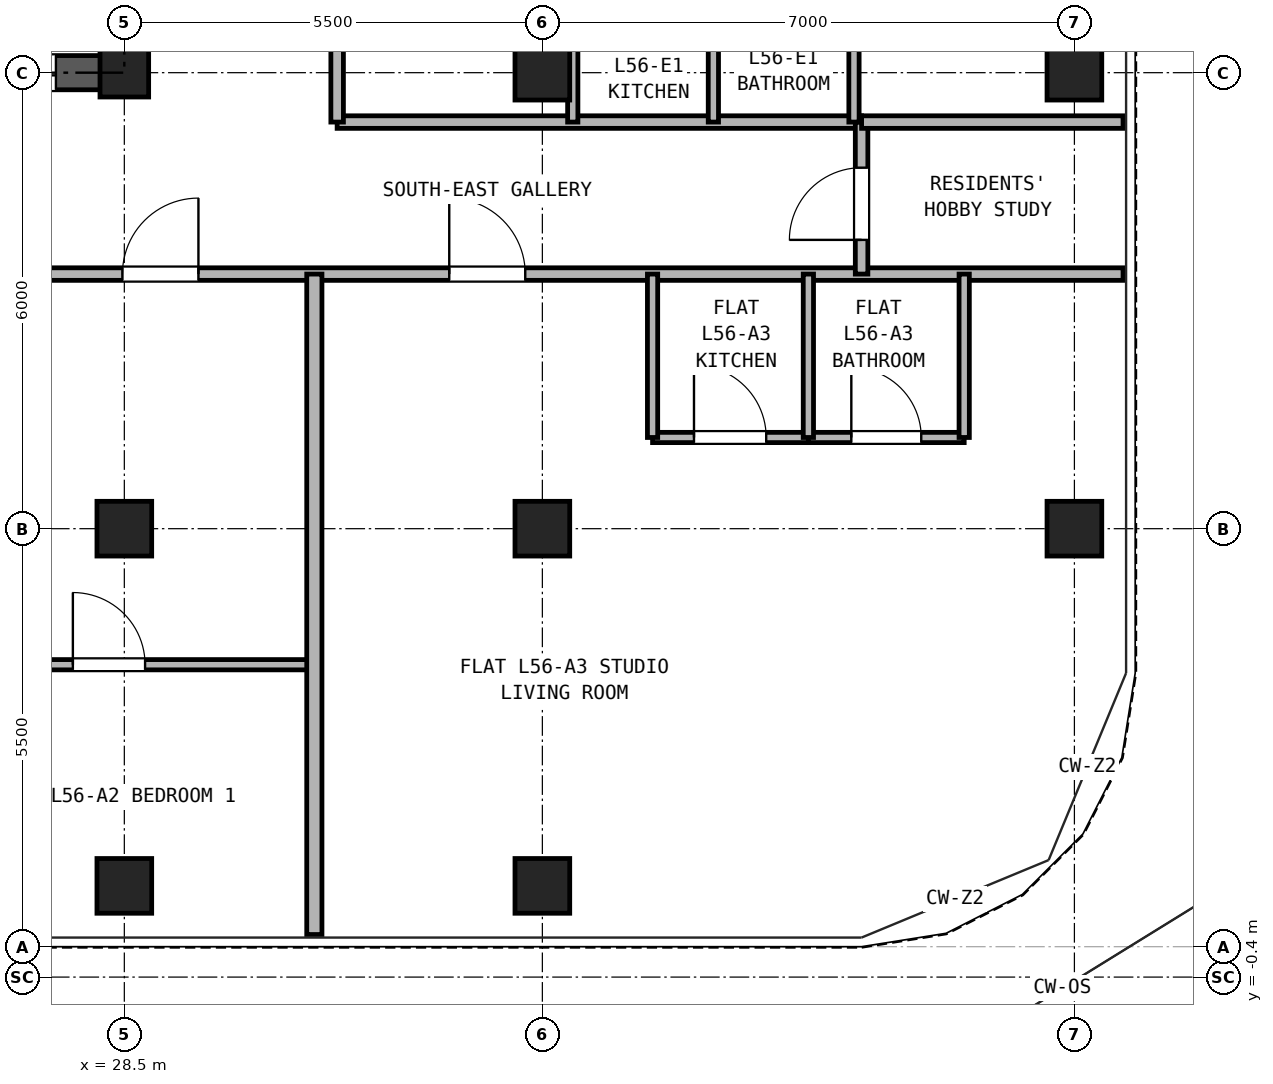
"""IFC4 building model, lengths in metres.
Left out: names, types, materials, properties, quantities, classifications, styles, units other than length and angle.
Written with IfcOpenShell. Run it as: python <this file> out.ifc"""

import sys

from ifc_helpers import new_model, si_unit, direction, frame, frame_2d, origin, origin_2d, place, context, subcontext, project, spatial, rectangle, hollow_rectangle, extrude, source, transform, mapped, element, fill, save


model = new_model("IFC4")
c1 = context("Model", 3, precision=1e-05, world=origin(), true_north=direction((0.0, 1.0)))
c2 = subcontext(c1, "Body", "Model", "MODEL_VIEW")
j1 = project(units=[si_unit("LENGTHUNIT", "METRE"), si_unit("PLANEANGLEUNIT", "RADIAN")], contexts=[c1])
p1 = place(None, origin())
s1 = spatial("IfcSite", under=j1, at=p1, CompositionType="ELEMENT")
p2 = place(p1, origin())
s2 = spatial("IfcBuilding", under=s1, at=p2, CompositionType="ELEMENT")
p3 = place(p2, frame((0.0, 0.0, 199.6)))
s3 = spatial("IfcBuildingStorey", under=s2, at=p3, CompositionType="ELEMENT", Elevation=199.6)
m1 = source(origin(), c2, "Body", "SweptSolid", [
    extrude(hollow_rectangle(XDim=0.72, YDim=0.72, WallThickness=0.04, at=origin_2d()), origin(), (0.0, 0.0, 1.0), 2.95),
])
for number, where, z_axis, x_axis in (
    (1, (28.5, 0.8, 0.0), (0.0, 0.0, 1.0), (1.0, 0.0, 0.0)),
    (2, (34.0, 0.8, 0.0), (0.0, 0.0, 1.0), (1.0, 0.0, 0.0)),
    (3, (41.0, 5.5, 0.0), (0.0, 0.0, 1.0), (1.0, 0.0, 0.0)),
    (4, (41.0, 11.5, 0.0), (0.0, 0.0, 1.0), (1.0, 0.0, 0.0)),
    (5, (28.5, 5.5, 0.0), (0.0, 0.0, 1.0), (1.0, 0.0, 0.0)),
):
    element("IfcColumn", number, at=place(p3, frame(where, z_axis=z_axis, x_axis=x_axis)), inside=s3, PredefinedType="COLUMN", context=c2, shape_type="MappedRepresentation", body=[
        mapped(m1, transform((0.0, 0.0, 0.0), x_axis=(1.0, 0.0, 0.0), y_axis=(0.0, 1.0, 0.0), z_axis=(0.0, 0.0, 1.0), scale=1.0)),
    ])
m2 = source(origin(), c2, "Body", "SweptSolid", [
    extrude(hollow_rectangle(XDim=0.64, YDim=0.64, WallThickness=0.035, at=origin_2d()), origin(), (0.0, 0.0, 1.0), 2.95),
])
p4 = place(p3, frame((28.5, 11.5, 0.0), z_axis=(0.0, 0.0, 1.0), x_axis=(1.0, 0.0, 0.0)))
e6 = element("IfcColumn", 6, at=p4, inside=s3, PredefinedType="COLUMN", context=c2, shape_type="MappedRepresentation", body=[
    mapped(m2, transform((0.0, 0.0, 0.0), x_axis=(1.0, 0.0, 0.0), y_axis=(0.0, 1.0, 0.0), z_axis=(0.0, 0.0, 1.0), scale=1.0)),
])
for number, where, z_axis, x_axis in (
    (7, (34.0, 5.5, 0.0), (0.0, 0.0, 1.0), (1.0, 0.0, 0.0)),
    (8, (34.0, 11.5, 0.0), (0.0, 0.0, 1.0), (1.0, 0.0, 0.0)),
):
    element("IfcColumn", number, at=place(p3, frame(where, z_axis=z_axis, x_axis=x_axis)), inside=s3, PredefinedType="COLUMN", context=c2, shape_type="MappedRepresentation", body=[
        mapped(m1, transform((0.0, 0.0, 0.0), x_axis=(1.0, 0.0, 0.0), y_axis=(0.0, 1.0, 0.0), z_axis=(0.0, 0.0, 1.0), scale=1.0)),
    ])
p5 = place(p3, frame((18.275, 11.5, 0.0), z_axis=(0.0, 0.0, 1.0), x_axis=(1.0, 0.0, 0.0)))
e9 = element("IfcWall", 9, at=p5, inside=s3, PredefinedType="SHEAR", context=c2, shape_type="SweptSolid", body=[
    extrude(rectangle(XDim=10.45, YDim=0.45, at=frame_2d((5.225, 0.0))), origin(), (0.0, 0.0, 1.0), 2.95),
])
p6 = place(p5, frame((1.825, 0.0, 0.0)))
e10 = element("IfcOpeningElement", 10, at=p6, cuts=e9, PredefinedType="OPENING", context=c2, shape_type="SweptSolid", body=[
    extrude(rectangle(XDim=0.95, YDim=2.15, at=frame_2d((0.475, 1.075))), frame((0.0, 0.235, 0.0), z_axis=(0.0, -1.0, 0.0), x_axis=(1.0, 0.0, 0.0)), (0.0, 0.0, 1.0), 0.47),
])
p7 = place(p5, frame((5.325, 0.0, 0.0)))
e11 = element("IfcOpeningElement", 11, at=p7, cuts=e9, PredefinedType="OPENING", context=c2, shape_type="SweptSolid", body=[
    extrude(rectangle(XDim=0.95, YDim=2.15, at=frame_2d((0.475, 1.075))), frame((0.0, 0.235, 0.0), z_axis=(0.0, -1.0, 0.0), x_axis=(1.0, 0.0, 0.0)), (0.0, 0.0, 1.0), 0.47),
])
p8 = place(p5, frame((8.225, 0.0, 0.0)))
e12 = element("IfcOpeningElement", 12, at=p8, cuts=e9, PredefinedType="OPENING", context=c2, shape_type="SweptSolid", body=[
    extrude(rectangle(XDim=1.1, YDim=2.25, at=frame_2d((0.55, 1.125))), frame((0.0, 0.235, 0.0), z_axis=(0.0, -1.0, 0.0), x_axis=(1.0, 0.0, 0.0)), (0.0, 0.0, 1.0), 0.47),
])
p9 = place(p3, frame((28.5, 11.725, 0.0), z_axis=(0.0, 0.0, 1.0), x_axis=(0.0, 1.0, 0.0)))
e13 = element("IfcWall", 13, at=p9, inside=s3, PredefinedType="SHEAR", context=c2, shape_type="SweptSolid", body=[
    extrude(rectangle(XDim=16.8, YDim=0.45, at=frame_2d((8.4, 0.0))), origin(), (0.0, 0.0, 1.0), 2.95),
])
p10 = place(p9, frame((7.425, 0.0, 0.0)))
e14 = element("IfcOpeningElement", 14, at=p10, cuts=e13, PredefinedType="OPENING", context=c2, shape_type="SweptSolid", body=[
    extrude(rectangle(XDim=1.15, YDim=2.2, at=frame_2d((0.575, 1.1))), frame((0.0, 0.235, 0.0), z_axis=(0.0, -1.0, 0.0), x_axis=(1.0, 0.0, 0.0)), (0.0, 0.0, 1.0), 0.47),
])
p11 = place(p3, frame((0.16, 8.85, 0.0), z_axis=(0.0, 0.0, 1.0), x_axis=(1.0, 0.0, 0.0)))
e15 = element("IfcWall", 15, at=p11, inside=s3, PredefinedType="PARTITIONING", context=c2, shape_type="SweptSolid", body=[
    extrude(rectangle(XDim=41.48, YDim=0.165, at=frame_2d((20.74, 0.0))), origin(), (0.0, 0.0, 1.0), 2.95),
])
p12 = place(p11, frame((14.815, 0.0, 0.0)))
e16 = element("IfcOpeningElement", 16, at=p12, cuts=e15, PredefinedType="OPENING", context=c2, shape_type="SweptSolid", body=[
    extrude(rectangle(XDim=1.0, YDim=2.15, at=frame_2d((0.5, 1.075))), frame((0.0, 0.093, 0.0), z_axis=(0.0, -1.0, 0.0), x_axis=(1.0, 0.0, 0.0)), (0.0, 0.0, 1.0), 0.185),
])
p13 = place(p11, frame((28.315, 0.0, 0.0)))
e17 = element("IfcOpeningElement", 17, at=p13, cuts=e15, PredefinedType="OPENING", context=c2, shape_type="SweptSolid", body=[
    extrude(rectangle(XDim=1.0, YDim=2.15, at=frame_2d((0.5, 1.075))), frame((0.0, 0.093, 0.0), z_axis=(0.0, -1.0, 0.0), x_axis=(1.0, 0.0, 0.0)), (0.0, 0.0, 1.0), 0.185),
])
p14 = place(p11, frame((32.615, 0.0, 0.0)))
e18 = element("IfcOpeningElement", 18, at=p14, cuts=e15, PredefinedType="OPENING", context=c2, shape_type="SweptSolid", body=[
    extrude(rectangle(XDim=1.0, YDim=2.15, at=frame_2d((0.5, 1.075))), frame((0.0, 0.093, 0.0), z_axis=(0.0, -1.0, 0.0), x_axis=(1.0, 0.0, 0.0)), (0.0, 0.0, 1.0), 0.185),
])
p15 = place(p3, frame((31.3, 10.85, 0.0), z_axis=(0.0, 0.0, 1.0), x_axis=(1.0, 0.0, 0.0)))
e19 = element("IfcWall", 19, at=p15, inside=s3, PredefinedType="PARTITIONING", context=c2, shape_type="SweptSolid", body=[
    extrude(rectangle(XDim=6.9, YDim=0.165, at=frame_2d((3.45, 0.0))), origin(), (0.0, 0.0, 1.0), 2.95),
])
p16 = place(p3, frame((38.2, 8.85, 0.0), z_axis=(0.0, 0.0, 1.0), x_axis=(0.0, 1.0, 0.0)))
e20 = element("IfcWall", 20, at=p16, inside=s3, PredefinedType="PARTITIONING", context=c2, shape_type="SweptSolid", body=[
    extrude(rectangle(XDim=2.0, YDim=0.165, at=frame_2d((1.0, 0.0))), origin(), (0.0, 0.0, 1.0), 2.95),
])
p17 = place(p16, frame((0.45, 0.0, 0.0)))
e21 = element("IfcOpeningElement", 21, at=p17, cuts=e20, PredefinedType="OPENING", context=c2, shape_type="SweptSolid", body=[
    extrude(rectangle(XDim=0.95, YDim=2.15, at=frame_2d((0.475, 1.075))), frame((0.0, 0.093, 0.0), z_axis=(0.0, -1.0, 0.0), x_axis=(1.0, 0.0, 0.0)), (0.0, 0.0, 1.0), 0.185),
])
p18 = place(p3, frame((31.3, 10.85, 0.0), z_axis=(0.0, 0.0, 1.0), x_axis=(0.0, 1.0, 0.0)))
e22 = element("IfcWall", 22, at=p18, inside=s3, PredefinedType="PARTITIONING", context=c2, shape_type="SweptSolid", body=[
    extrude(rectangle(XDim=24.29, YDim=0.165, at=frame_2d((12.145, 0.0))), origin(), (0.0, 0.0, 1.0), 2.95),
])
p19 = place(p18, frame((3.675, 0.0, 0.0)))
e23 = element("IfcOpeningElement", 23, at=p19, cuts=e22, PredefinedType="OPENING", context=c2, shape_type="SweptSolid", body=[
    extrude(rectangle(XDim=1.0, YDim=2.15, at=frame_2d((0.5, 1.075))), frame((0.0, 0.093, 0.0), z_axis=(0.0, -1.0, 0.0), x_axis=(1.0, 0.0, 0.0)), (0.0, 0.0, 1.0), 0.185),
])
p20 = place(p18, frame((11.95, 0.0, 0.0)))
e24 = element("IfcOpeningElement", 24, at=p20, cuts=e22, PredefinedType="OPENING", context=c2, shape_type="SweptSolid", body=[
    extrude(rectangle(XDim=1.0, YDim=2.15, at=frame_2d((0.5, 1.075))), frame((0.0, 0.093, 0.0), z_axis=(0.0, -1.0, 0.0), x_axis=(1.0, 0.0, 0.0)), (0.0, 0.0, 1.0), 0.185),
])
p21 = place(p18, frame((17.75, 0.0, 0.0)))
e25 = element("IfcOpeningElement", 25, at=p21, cuts=e22, PredefinedType="OPENING", context=c2, shape_type="SweptSolid", body=[
    extrude(rectangle(XDim=1.0, YDim=2.15, at=frame_2d((0.5, 1.075))), frame((0.0, 0.093, 0.0), z_axis=(0.0, -1.0, 0.0), x_axis=(1.0, 0.0, 0.0)), (0.0, 0.0, 1.0), 0.185),
])
p22 = place(p3, frame((25.606, 3.71, 0.0), z_axis=(0.0, 0.0, 1.0), x_axis=(1.0, 0.0, 0.0)))
e26 = element("IfcWall", 26, at=p22, inside=s3, PredefinedType="PARTITIONING", context=c2, shape_type="SweptSolid", body=[
    extrude(rectangle(XDim=5.394, YDim=0.135, at=frame_2d((2.697, 0.0))), origin(), (0.0, 0.0, 1.0), 2.95),
])
p23 = place(p22, frame((2.217, 0.0, 0.0)))
e27 = element("IfcOpeningElement", 27, at=p23, cuts=e26, PredefinedType="OPENING", context=c2, shape_type="SweptSolid", body=[
    extrude(rectangle(XDim=0.95, YDim=2.15, at=frame_2d((0.475, 1.075))), frame((0.0, 0.077, 0.0), z_axis=(0.0, -1.0, 0.0), x_axis=(1.0, 0.0, 0.0)), (0.0, 0.0, 1.0), 0.155),
])
p24 = place(p3, frame((31.0, 0.16, 0.0), z_axis=(0.0, 0.0, 1.0), x_axis=(0.0, 1.0, 0.0)))
e28 = element("IfcWall", 28, at=p24, inside=s3, PredefinedType="PARTITIONING", context=c2, shape_type="SweptSolid", body=[
    extrude(rectangle(XDim=8.69, YDim=0.2, at=frame_2d((4.345, 0.0))), origin(), (0.0, 0.0, 1.0), 2.95),
])
p25 = place(p3, frame((35.45, 6.7, 0.0), z_axis=(0.0, 0.0, 1.0), x_axis=(1.0, 0.0, 0.0)))
e29 = element("IfcWall", 29, at=p25, inside=s3, PredefinedType="PARTITIONING", context=c2, shape_type="SweptSolid", body=[
    extrude(rectangle(XDim=2.05, YDim=0.135, at=frame_2d((1.025, 0.0))), origin(), (0.0, 0.0, 1.0), 2.95),
])
p26 = place(p25, frame((0.545, 0.0, 0.0)))
e30 = element("IfcOpeningElement", 30, at=p26, cuts=e29, PredefinedType="OPENING", context=c2, shape_type="SweptSolid", body=[
    extrude(rectangle(XDim=0.95, YDim=2.15, at=frame_2d((0.475, 1.075))), frame((0.0, 0.077, 0.0), z_axis=(0.0, -1.0, 0.0), x_axis=(1.0, 0.0, 0.0)), (0.0, 0.0, 1.0), 0.155),
])
p27 = place(p3, frame((37.5, 6.7, 0.0), z_axis=(0.0, 0.0, 1.0), x_axis=(1.0, 0.0, 0.0)))
e31 = element("IfcWall", 31, at=p27, inside=s3, PredefinedType="PARTITIONING", context=c2, shape_type="SweptSolid", body=[
    extrude(rectangle(XDim=2.05, YDim=0.135, at=frame_2d((1.025, 0.0))), origin(), (0.0, 0.0, 1.0), 2.95),
])
p28 = place(p27, frame((0.565, 0.0, 0.0)))
e32 = element("IfcOpeningElement", 32, at=p28, cuts=e31, PredefinedType="OPENING", context=c2, shape_type="SweptSolid", body=[
    extrude(rectangle(XDim=0.92, YDim=2.1, at=frame_2d((0.46, 1.05))), frame((0.0, 0.077, 0.0), z_axis=(0.0, -1.0, 0.0), x_axis=(1.0, 0.0, 0.0)), (0.0, 0.0, 1.0), 0.155),
])
for number, where, z_axis, x_axis in (
    (33, (35.45, 6.7, 0.0), (0.0, 0.0, 1.0), (0.0, 1.0, 0.0)),
    (34, (37.5, 6.7, 0.0), (0.0, 0.0, 1.0), (0.0, 1.0, 0.0)),
    (35, (39.55, 6.7, 0.0), (0.0, 0.0, 1.0), (0.0, 1.0, 0.0)),
):
    element("IfcWall", number, at=place(p3, frame(where, z_axis=z_axis, x_axis=x_axis)), inside=s3, PredefinedType="PARTITIONING", context=c2, shape_type="SweptSolid", body=[
        extrude(rectangle(XDim=2.15, YDim=0.135, at=frame_2d((1.075, 0.0))), origin(), (0.0, 0.0, 1.0), 2.95),
    ])
p29 = place(p3, frame((38.2, 10.85, 0.0), z_axis=(0.0, 0.0, 1.0), x_axis=(1.0, 0.0, 0.0)))
e36 = element("IfcWall", 36, at=p29, inside=s3, PredefinedType="PARTITIONING", context=c2, shape_type="SweptSolid", body=[
    extrude(rectangle(XDim=3.44, YDim=0.165, at=frame_2d((1.72, 0.0))), origin(), (0.0, 0.0, 1.0), 2.95),
])
for number, where, z_axis, x_axis in (
    (37, (34.4, 10.85, 0.0), (0.0, 0.0, 1.0), (0.0, 1.0, 0.0)),
    (38, (36.25, 10.85, 0.0), (0.0, 0.0, 1.0), (0.0, 1.0, 0.0)),
    (39, (38.1, 10.85, 0.0), (0.0, 0.0, 1.0), (0.0, 1.0, 0.0)),
):
    element("IfcWall", number, at=place(p3, frame(where, z_axis=z_axis, x_axis=x_axis)), inside=s3, PredefinedType="PARTITIONING", context=c2, shape_type="SweptSolid", body=[
        extrude(rectangle(XDim=2.15, YDim=0.135, at=frame_2d((1.075, 0.0))), origin(), (0.0, 0.0, 1.0), 2.95),
    ])
p30 = place(p8, frame((1.1, 0.0, 0.0), z_axis=(0.0, 0.0, 1.0), x_axis=(-1.0, 0.0, 0.0)))
e40 = element("IfcDoor", 40, at=p30, inside=s3, OperationType="DOUBLE_DOOR_SLIDING", PredefinedType="DOOR", context=c2, shape_type="SweptSolid", body=[
    extrude(rectangle(XDim=1.1, YDim=2.25, at=frame_2d((0.55, 1.125))), frame((0.0, 0.025, 0.0), z_axis=(0.0, -1.0, 0.0), x_axis=(1.0, 0.0, 0.0)), (0.0, 0.0, 1.0), 0.05),
])
fill(e12, e40)
p31 = place(p23, frame((0.95, 0.0, 0.0), z_axis=(0.0, 0.0, 1.0), x_axis=(-1.0, 0.0, 0.0)))
e41 = element("IfcDoor", 41, at=p31, inside=s3, OperationType="SINGLE_SWING_LEFT", PredefinedType="DOOR", context=c2, shape_type="SweptSolid", body=[
    extrude(rectangle(XDim=0.95, YDim=2.15, at=frame_2d((0.475, 1.075))), frame((0.0, 0.025, 0.0), z_axis=(0.0, -1.0, 0.0), x_axis=(1.0, 0.0, 0.0)), (0.0, 0.0, 1.0), 0.05),
])
fill(e27, e41)
p32 = place(p13, frame((1.0, 0.0, 0.0), z_axis=(0.0, 0.0, 1.0), x_axis=(-1.0, 0.0, 0.0)))
e42 = element("IfcDoor", 42, at=p32, inside=s3, OperationType="SINGLE_SWING_RIGHT", PredefinedType="DOOR", context=c2, shape_type="SweptSolid", body=[
    extrude(rectangle(XDim=1.0, YDim=2.15, at=frame_2d((0.5, 1.075))), frame((0.0, 0.025, 0.0), z_axis=(0.0, -1.0, 0.0), x_axis=(1.0, 0.0, 0.0)), (0.0, 0.0, 1.0), 0.05),
])
fill(e17, e42)
p33 = place(p26, origin())
e43 = element("IfcDoor", 43, at=p33, inside=s3, OperationType="SINGLE_SWING_LEFT", PredefinedType="DOOR", context=c2, shape_type="SweptSolid", body=[
    extrude(rectangle(XDim=0.95, YDim=2.15, at=frame_2d((0.475, 1.075))), frame((0.0, 0.025, 0.0), z_axis=(0.0, -1.0, 0.0), x_axis=(1.0, 0.0, 0.0)), (0.0, 0.0, 1.0), 0.05),
])
fill(e30, e43)
p34 = place(p28, origin())
e44 = element("IfcDoor", 44, at=p34, inside=s3, OperationType="SINGLE_SWING_LEFT", PredefinedType="DOOR", context=c2, shape_type="SweptSolid", body=[
    extrude(rectangle(XDim=0.92, YDim=2.1, at=frame_2d((0.46, 1.05))), frame((0.0, 0.025, 0.0), z_axis=(0.0, -1.0, 0.0), x_axis=(1.0, 0.0, 0.0)), (0.0, 0.0, 1.0), 0.05),
])
fill(e32, e44)
p35 = place(p14, frame((1.0, 0.0, 0.0), z_axis=(0.0, 0.0, 1.0), x_axis=(-1.0, 0.0, 0.0)))
e45 = element("IfcDoor", 45, at=p35, inside=s3, OperationType="SINGLE_SWING_LEFT", PredefinedType="DOOR", context=c2, shape_type="SweptSolid", body=[
    extrude(rectangle(XDim=1.0, YDim=2.15, at=frame_2d((0.5, 1.075))), frame((0.0, 0.025, 0.0), z_axis=(0.0, -1.0, 0.0), x_axis=(1.0, 0.0, 0.0)), (0.0, 0.0, 1.0), 0.05),
])
fill(e18, e45)
p36 = place(p17, origin())
e46 = element("IfcDoor", 46, at=p36, inside=s3, OperationType="SINGLE_SWING_LEFT", PredefinedType="DOOR", context=c2, shape_type="SweptSolid", body=[
    extrude(rectangle(XDim=0.95, YDim=2.15, at=frame_2d((0.475, 1.075))), frame((0.0, 0.025, 0.0), z_axis=(0.0, -1.0, 0.0), x_axis=(1.0, 0.0, 0.0)), (0.0, 0.0, 1.0), 0.05),
])
fill(e21, e46)
save(model, sys.argv[1])
